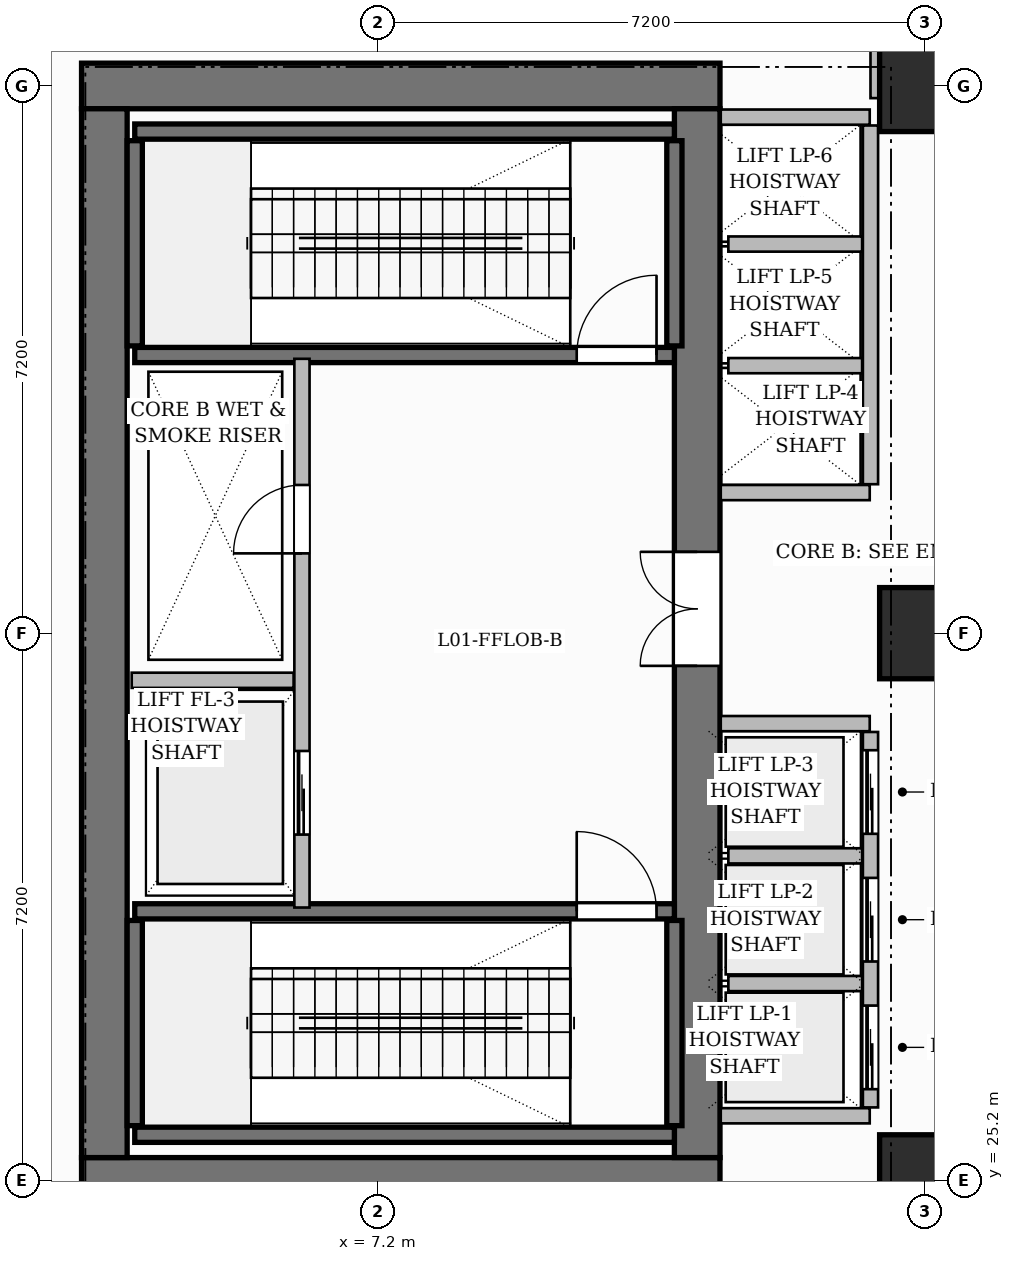
"""IFC4 building model, lengths in metres.
Left out: names, types, materials, properties, quantities, classifications, styles, units other than length and angle.
Written with IfcOpenShell. Run it as: python <this file> out.ifc"""

import sys

from ifc_helpers import new_model, si_unit, direction, frame, frame_2d, origin, origin_2d, place, context, subcontext, project, spatial, rectangle, extrude, source, transform, mapped, element, fill, save


model = new_model("IFC4")
c1 = context("Model", 3, precision=1e-05, world=origin(), true_north=direction((0.0, 1.0)))
c2 = subcontext(c1, "Body", "Model", "MODEL_VIEW")
j1 = project(units=[si_unit("LENGTHUNIT", "METRE"), si_unit("PLANEANGLEUNIT", "RADIAN")], contexts=[c1])
p1 = place(None, origin())
s1 = spatial("IfcSite", under=j1, at=p1, CompositionType="ELEMENT")
p2 = place(p1, origin())
s2 = spatial("IfcBuilding", under=s1, at=p2, CompositionType="ELEMENT")
p3 = place(p2, frame((0.0, 0.0, 5.4)))
s3 = spatial("IfcBuildingStorey", under=s2, at=p3, CompositionType="ELEMENT", Elevation=5.4)
for number, where, z_axis, x_axis in (
    (1, (3.3, 25.2, 0.0), (0.0, 0.0, 1.0), (1.0, 0.0, 0.0)),
    (2, (3.3, 39.6, 0.0), (0.0, 0.0, 1.0), (1.0, 0.0, 0.0)),
):
    element("IfcWall", number, at=place(p3, frame(where, z_axis=z_axis, x_axis=x_axis)), inside=s3, PredefinedType="SHEAR", context=c2, shape_type="SweptSolid", body=[
        extrude(rectangle(XDim=8.4, YDim=0.6, at=frame_2d((4.2, 0.0))), origin(), (0.0, 0.0, 1.0), 5.4),
    ])
p4 = place(p3, frame((3.6, 25.5, 0.0), z_axis=(0.0, 0.0, 1.0), x_axis=(0.0, 1.0, 0.0)))
e3 = element("IfcWall", 3, at=p4, inside=s3, PredefinedType="SHEAR", context=c2, shape_type="SweptSolid", body=[
    extrude(rectangle(XDim=13.8, YDim=0.6, at=frame_2d((6.9, 0.0))), origin(), (0.0, 0.0, 1.0), 5.4),
])
p5 = place(p3, frame((11.4, 25.5, 0.0), z_axis=(0.0, 0.0, 1.0), x_axis=(0.0, 1.0, 0.0)))
e4 = element("IfcWall", 4, at=p5, inside=s3, PredefinedType="SHEAR", context=c2, shape_type="SweptSolid", body=[
    extrude(rectangle(XDim=13.8, YDim=0.6, at=frame_2d((6.9, 0.0))), origin(), (0.0, 0.0, 1.0), 5.4),
])
p6 = place(p5, frame((6.47, 0.0, 0.0)))
e5 = element("IfcOpeningElement", 5, at=p6, cuts=e4, PredefinedType="OPENING", context=c2, shape_type="SweptSolid", body=[
    extrude(rectangle(XDim=1.5, YDim=2.2, at=frame_2d((0.75, 1.1))), frame((0.0, 0.31, 0.0), z_axis=(0.0, -1.0, 0.0), x_axis=(1.0, 0.0, 0.0)), (0.0, 0.0, 1.0), 0.62),
])
m1 = source(origin(), c2, "Body", "SweptSolid", [
    extrude(rectangle(XDim=1.2, YDim=1.2, at=origin_2d()), origin(), (0.0, 0.0, 1.0), 5.4),
])
for number, where, z_axis, x_axis in (
    (6, (14.4, 25.2, 0.0), (0.0, 0.0, 1.0), (1.0, 0.0, 0.0)),
    (7, (14.4, 32.4, 0.0), (0.0, 0.0, 1.0), (1.0, 0.0, 0.0)),
    (8, (14.4, 39.6, 0.0), (0.0, 0.0, 1.0), (1.0, 0.0, 0.0)),
):
    element("IfcColumn", number, at=place(p3, frame(where, z_axis=z_axis, x_axis=x_axis)), inside=s3, PredefinedType="COLUMN", context=c2, shape_type="MappedRepresentation", body=[
        mapped(m1, transform((0.0, 0.0, 0.0), scale=1.0)),
    ])
p7 = place(p3, frame((4.0, 25.8, 0.0), z_axis=(0.0, 0.0, 1.0), x_axis=(1.0, 0.0, 0.0)))
e9 = element("IfcWall", 9, at=p7, inside=s3, PredefinedType="SHEAR", context=c2, shape_type="SweptSolid", body=[
    extrude(rectangle(XDim=7.1, YDim=0.2, at=frame_2d((3.55, 0.0))), origin(), (0.0, 0.0, 1.0), 5.4),
])
for number, where, z_axis, x_axis in (
    (10, (4.0, 25.92, 0.0), (0.0, 0.0, 1.0), (0.0, 1.0, 0.0)),
    (11, (11.1, 25.92, 0.0), (0.0, 0.0, 1.0), (0.0, 1.0, 0.0)),
):
    element("IfcWall", number, at=place(p3, frame(where, z_axis=z_axis, x_axis=x_axis)), inside=s3, PredefinedType="SHEAR", context=c2, shape_type="SweptSolid", body=[
        extrude(rectangle(XDim=2.7, YDim=0.2, at=frame_2d((1.35, 0.0))), origin(), (0.0, 0.0, 1.0), 5.4),
    ])
p8 = place(p3, frame((4.0, 28.74, 0.0), z_axis=(0.0, 0.0, 1.0), x_axis=(1.0, 0.0, 0.0)))
e12 = element("IfcWall", 12, at=p8, inside=s3, PredefinedType="SHEAR", context=c2, shape_type="SweptSolid", body=[
    extrude(rectangle(XDim=7.1, YDim=0.2, at=frame_2d((3.55, 0.0))), origin(), (0.0, 0.0, 1.0), 5.4),
])
p9 = place(p8, frame((5.815, 0.0, 0.0)))
e13 = element("IfcOpeningElement", 13, at=p9, cuts=e12, PredefinedType="OPENING", context=c2, shape_type="SweptSolid", body=[
    extrude(rectangle(XDim=1.05, YDim=2.2, at=frame_2d((0.525, 1.1))), frame((0.0, 0.11, 0.0), z_axis=(0.0, -1.0, 0.0), x_axis=(1.0, 0.0, 0.0)), (0.0, 0.0, 1.0), 0.22),
])
p10 = place(p3, frame((4.0, 39.0, 0.0), z_axis=(0.0, 0.0, 1.0), x_axis=(1.0, 0.0, 0.0)))
e14 = element("IfcWall", 14, at=p10, inside=s3, PredefinedType="SHEAR", context=c2, shape_type="SweptSolid", body=[
    extrude(rectangle(XDim=7.1, YDim=0.2, at=frame_2d((3.55, 0.0))), origin(), (0.0, 0.0, 1.0), 5.4),
])
for number, where, z_axis, x_axis in (
    (15, (4.0, 36.18, 0.0), (0.0, 0.0, 1.0), (0.0, 1.0, 0.0)),
    (16, (11.1, 36.18, 0.0), (0.0, 0.0, 1.0), (0.0, 1.0, 0.0)),
):
    element("IfcWall", number, at=place(p3, frame(where, z_axis=z_axis, x_axis=x_axis)), inside=s3, PredefinedType="SHEAR", context=c2, shape_type="SweptSolid", body=[
        extrude(rectangle(XDim=2.7, YDim=0.2, at=frame_2d((1.35, 0.0))), origin(), (0.0, 0.0, 1.0), 5.4),
    ])
p11 = place(p3, frame((4.0, 36.06, 0.0), z_axis=(0.0, 0.0, 1.0), x_axis=(1.0, 0.0, 0.0)))
e17 = element("IfcWall", 17, at=p11, inside=s3, PredefinedType="SHEAR", context=c2, shape_type="SweptSolid", body=[
    extrude(rectangle(XDim=7.1, YDim=0.2, at=frame_2d((3.55, 0.0))), origin(), (0.0, 0.0, 1.0), 5.4),
])
p12 = place(p11, frame((5.815, 0.0, 0.0)))
e18 = element("IfcOpeningElement", 18, at=p12, cuts=e17, PredefinedType="OPENING", context=c2, shape_type="SweptSolid", body=[
    extrude(rectangle(XDim=1.05, YDim=2.2, at=frame_2d((0.525, 1.1))), frame((0.0, 0.11, 0.0), z_axis=(0.0, -1.0, 0.0), x_axis=(1.0, 0.0, 0.0)), (0.0, 0.0, 1.0), 0.22),
])
p13 = place(p3, frame((6.2, 28.79, 0.0), z_axis=(0.0, 0.0, 1.0), x_axis=(0.0, 1.0, 0.0)))
e19 = element("IfcWall", 19, at=p13, inside=s3, PredefinedType="PARTITIONING", context=c2, shape_type="SweptSolid", body=[
    extrude(rectangle(XDim=7.22, YDim=0.2, at=frame_2d((3.61, 0.0))), origin(), (0.0, 0.0, 1.0), 5.1),
])
p14 = place(p13, frame((4.66, 0.0, 0.0)))
e20 = element("IfcOpeningElement", 20, at=p14, cuts=e19, PredefinedType="OPENING", context=c2, shape_type="SweptSolid", body=[
    extrude(rectangle(XDim=0.9, YDim=2.1, at=frame_2d((0.45, 1.05))), frame((0.0, 0.11, 0.0), z_axis=(0.0, -1.0, 0.0), x_axis=(1.0, 0.0, 0.0)), (0.0, 0.0, 1.0), 0.22),
])
p15 = place(p13, frame((0.96, 0.0, 0.0)))
e21 = element("IfcOpeningElement", 21, at=p15, cuts=e19, PredefinedType="OPENING", context=c2, shape_type="SweptSolid", body=[
    extrude(rectangle(XDim=1.1, YDim=2.2, at=frame_2d((0.55, 1.1))), frame((0.0, 0.11, 0.0), z_axis=(0.0, -1.0, 0.0), x_axis=(1.0, 0.0, 0.0)), (0.0, 0.0, 1.0), 0.22),
])
p16 = place(p3, frame((3.96, 31.78, 0.0), z_axis=(0.0, 0.0, 1.0), x_axis=(1.0, 0.0, 0.0)))
e22 = element("IfcWall", 22, at=p16, inside=s3, PredefinedType="PARTITIONING", context=c2, shape_type="SweptSolid", body=[
    extrude(rectangle(XDim=2.13, YDim=0.2, at=frame_2d((1.065, 0.0))), origin(), (0.0, 0.0, 1.0), 5.1),
])
for number, where, z_axis, x_axis in (
    (23, (11.71, 26.05, 0.0), (0.0, 0.0, 1.0), (1.0, 0.0, 0.0)),
    (24, (11.71, 31.21, 0.0), (0.0, 0.0, 1.0), (1.0, 0.0, 0.0)),
):
    element("IfcWall", number, at=place(p3, frame(where, z_axis=z_axis, x_axis=x_axis)), inside=s3, PredefinedType="PARTITIONING", context=c2, shape_type="SweptSolid", body=[
        extrude(rectangle(XDim=1.96, YDim=0.2, at=frame_2d((0.98, 0.0))), origin(), (0.0, 0.0, 1.0), 5.1),
    ])
p17 = place(p3, frame((13.68, 26.16, 0.0), z_axis=(0.0, 0.0, 1.0), x_axis=(0.0, 1.0, 0.0)))
e25 = element("IfcWall", 25, at=p17, inside=s3, PredefinedType="PARTITIONING", context=c2, shape_type="SweptSolid", body=[
    extrude(rectangle(XDim=4.94, YDim=0.2, at=frame_2d((2.47, 0.0))), origin(), (0.0, 0.0, 1.0), 5.1),
])
p18 = place(p17, frame((0.24, 0.0, 0.0)))
e26 = element("IfcOpeningElement", 26, at=p18, cuts=e25, PredefinedType="OPENING", context=c2, shape_type="SweptSolid", body=[
    extrude(rectangle(XDim=1.1, YDim=2.2, at=frame_2d((0.55, 1.1))), frame((0.0, 0.11, 0.0), z_axis=(0.0, -1.0, 0.0), x_axis=(1.0, 0.0, 0.0)), (0.0, 0.0, 1.0), 0.22),
])
p19 = place(p17, frame((1.92, 0.0, 0.0)))
e27 = element("IfcOpeningElement", 27, at=p19, cuts=e25, PredefinedType="OPENING", context=c2, shape_type="SweptSolid", body=[
    extrude(rectangle(XDim=1.1, YDim=2.2, at=frame_2d((0.55, 1.1))), frame((0.0, 0.11, 0.0), z_axis=(0.0, -1.0, 0.0), x_axis=(1.0, 0.0, 0.0)), (0.0, 0.0, 1.0), 0.22),
])
p20 = place(p17, frame((3.6, 0.0, 0.0)))
e28 = element("IfcOpeningElement", 28, at=p20, cuts=e25, PredefinedType="OPENING", context=c2, shape_type="SweptSolid", body=[
    extrude(rectangle(XDim=1.1, YDim=2.2, at=frame_2d((0.55, 1.1))), frame((0.0, 0.11, 0.0), z_axis=(0.0, -1.0, 0.0), x_axis=(1.0, 0.0, 0.0)), (0.0, 0.0, 1.0), 0.22),
])
for number, where, z_axis, x_axis in (
    (29, (11.81, 27.79, 0.0), (0.0, 0.0, 1.0), (1.0, 0.0, 0.0)),
    (30, (11.81, 29.47, 0.0), (0.0, 0.0, 1.0), (1.0, 0.0, 0.0)),
):
    element("IfcWall", number, at=place(p3, frame(where, z_axis=z_axis, x_axis=x_axis)), inside=s3, PredefinedType="PARTITIONING", context=c2, shape_type="SweptSolid", body=[
        extrude(rectangle(XDim=1.76, YDim=0.2, at=frame_2d((0.88, 0.0))), origin(), (0.0, 0.0, 1.0), 5.1),
    ])
for number, where, z_axis, x_axis in (
    (31, (11.71, 34.25, 0.0), (0.0, 0.0, 1.0), (1.0, 0.0, 0.0)),
    (32, (11.71, 39.19, 0.0), (0.0, 0.0, 1.0), (1.0, 0.0, 0.0)),
):
    element("IfcWall", number, at=place(p3, frame(where, z_axis=z_axis, x_axis=x_axis)), inside=s3, PredefinedType="PARTITIONING", context=c2, shape_type="SweptSolid", body=[
        extrude(rectangle(XDim=1.96, YDim=0.2, at=frame_2d((0.98, 0.0))), origin(), (0.0, 0.0, 1.0), 5.1),
    ])
p21 = place(p3, frame((13.68, 34.36, 0.0), z_axis=(0.0, 0.0, 1.0), x_axis=(0.0, 1.0, 0.0)))
e33 = element("IfcWall", 33, at=p21, inside=s3, PredefinedType="PARTITIONING", context=c2, shape_type="SweptSolid", body=[
    extrude(rectangle(XDim=4.72, YDim=0.2, at=frame_2d((2.36, 0.0))), origin(), (0.0, 0.0, 1.0), 5.1),
])
for number, where, z_axis, x_axis in (
    (34, (11.81, 35.92, 0.0), (0.0, 0.0, 1.0), (1.0, 0.0, 0.0)),
    (35, (11.81, 37.52, 0.0), (0.0, 0.0, 1.0), (1.0, 0.0, 0.0)),
):
    element("IfcWall", number, at=place(p3, frame(where, z_axis=z_axis, x_axis=x_axis)), inside=s3, PredefinedType="PARTITIONING", context=c2, shape_type="SweptSolid", body=[
        extrude(rectangle(XDim=1.76, YDim=0.2, at=frame_2d((0.88, 0.0))), origin(), (0.0, 0.0, 1.0), 5.1),
    ])
p22 = place(p3, frame((13.75, 39.44, 0.0), z_axis=(0.0, 0.0, 1.0), x_axis=(0.0, 1.0, 0.0)))
e36 = element("IfcWall", 36, at=p22, inside=s3, PredefinedType="PARTITIONING", context=c2, shape_type="SweptSolid", body=[
    extrude(rectangle(XDim=7.192, YDim=0.14, at=frame_2d((3.596, 0.0))), origin(), (0.0, 0.0, 1.0), 5.1),
])
p23 = place(p3, frame((13.84, 39.35, 0.0), z_axis=(0.0, 0.0, 1.0), x_axis=(1.0, 0.0, 0.0)))
e37 = element("IfcWall", 37, at=p23, inside=s3, PredefinedType="PARTITIONING", context=c2, shape_type="SweptSolid", body=[
    extrude(rectangle(XDim=7.92, YDim=0.16, at=frame_2d((3.96, 0.0))), origin(), (0.0, 0.0, 1.0), 4.185),
])
p24 = place(p23, frame((1.22, 0.0, 0.0)))
e38 = element("IfcOpeningElement", 38, at=p24, cuts=e37, PredefinedType="OPENING", context=c2, shape_type="SweptSolid", body=[
    extrude(rectangle(XDim=1.6, YDim=2.4, at=frame_2d((0.8, 1.2))), frame((0.0, 0.09, 0.0), z_axis=(0.0, -1.0, 0.0), x_axis=(1.0, 0.0, 0.0)), (0.0, 0.0, 1.0), 0.18),
])
m2 = source(origin(), c2, "Body", "SweptSolid", [
    extrude(rectangle(XDim=1.05, YDim=2.2, at=frame_2d((0.525, 1.1))), frame((0.0, 0.025, 0.0), z_axis=(0.0, -1.0, 0.0), x_axis=(1.0, 0.0, 0.0)), (0.0, 0.0, 1.0), 0.05),
])
p25 = place(p9, origin())
e39 = element("IfcDoor", 39, at=p25, inside=s3, OperationType="SINGLE_SWING_LEFT", PredefinedType="DOOR", context=c2, shape_type="MappedRepresentation", body=[
    mapped(m2, transform((0.0, 0.0, 0.0), scale=1.0)),
])
fill(e13, e39)
p26 = place(p12, origin())
e40 = element("IfcDoor", 40, at=p26, inside=s3, OperationType="SINGLE_SWING_RIGHT", PredefinedType="DOOR", context=c2, shape_type="MappedRepresentation", body=[
    mapped(m2, transform((0.0, 0.0, 0.0), scale=1.0)),
])
fill(e18, e40)
m3 = source(origin(), c2, "Body", "SweptSolid", [
    extrude(rectangle(XDim=0.9, YDim=2.1, at=frame_2d((0.45, 1.05))), frame((0.0, 0.025, 0.0), z_axis=(0.0, -1.0, 0.0), x_axis=(1.0, 0.0, 0.0)), (0.0, 0.0, 1.0), 0.05),
])
p27 = place(p14, origin())
e41 = element("IfcDoor", 41, at=p27, inside=s3, OperationType="SINGLE_SWING_LEFT", PredefinedType="DOOR", context=c2, shape_type="MappedRepresentation", body=[
    mapped(m3, transform((0.0, 0.0, 0.0), scale=1.0)),
])
fill(e20, e41)
m4 = source(origin(), c2, "Body", "SweptSolid", [
    extrude(rectangle(XDim=1.5, YDim=2.2, at=frame_2d((0.75, 1.1))), frame((0.0, 0.025, 0.0), z_axis=(0.0, -1.0, 0.0), x_axis=(1.0, 0.0, 0.0)), (0.0, 0.0, 1.0), 0.05),
])
p28 = place(p6, origin())
e42 = element("IfcDoor", 42, at=p28, inside=s3, OperationType="DOUBLE_DOOR_SINGLE_SWING", PredefinedType="DOOR", context=c2, shape_type="MappedRepresentation", body=[
    mapped(m4, transform((0.0, 0.0, 0.0), scale=1.0)),
])
fill(e5, e42)
m5 = source(origin(), c2, "Body", "SweptSolid", [
    extrude(rectangle(XDim=1.1, YDim=2.2, at=frame_2d((0.55, 1.1))), frame((0.0, 0.025, 0.0), z_axis=(0.0, -1.0, 0.0), x_axis=(1.0, 0.0, 0.0)), (0.0, 0.0, 1.0), 0.05),
])
p29 = place(p15, origin())
e43 = element("IfcDoor", 43, at=p29, inside=s3, OperationType="SLIDING_TO_LEFT", PredefinedType="DOOR", context=c2, shape_type="MappedRepresentation", body=[
    mapped(m5, transform((0.0, 0.0, 0.0), scale=1.0)),
])
fill(e21, e43)
p30 = place(p18, origin())
e44 = element("IfcDoor", 44, at=p30, inside=s3, OperationType="SLIDING_TO_LEFT", PredefinedType="DOOR", context=c2, shape_type="MappedRepresentation", body=[
    mapped(m5, transform((0.0, 0.0, 0.0), scale=1.0)),
])
fill(e26, e44)
p31 = place(p19, origin())
e45 = element("IfcDoor", 45, at=p31, inside=s3, OperationType="SLIDING_TO_LEFT", PredefinedType="DOOR", context=c2, shape_type="MappedRepresentation", body=[
    mapped(m5, transform((0.0, 0.0, 0.0), scale=1.0)),
])
fill(e27, e45)
p32 = place(p20, origin())
e46 = element("IfcDoor", 46, at=p32, inside=s3, OperationType="SLIDING_TO_LEFT", PredefinedType="DOOR", context=c2, shape_type="MappedRepresentation", body=[
    mapped(m5, transform((0.0, 0.0, 0.0), scale=1.0)),
])
fill(e28, e46)
save(model, sys.argv[1])
